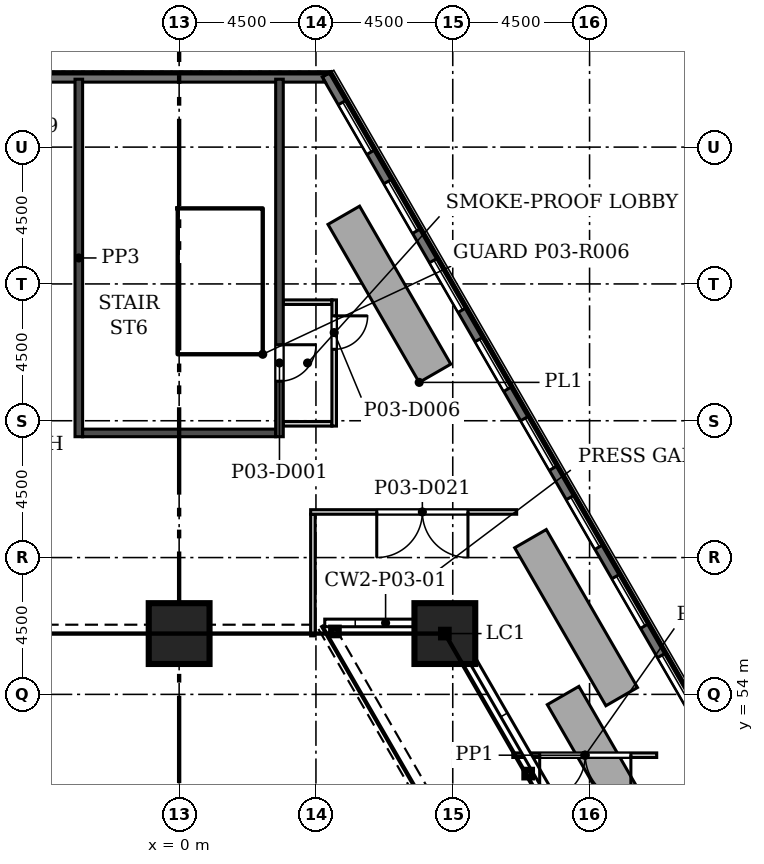
"""IFC4 building model, lengths in metres.
Left out: names, types, materials, properties, quantities, classifications, styles, units other than length and angle.
Written with IfcOpenShell. Run it as: python <this file> out.ifc"""

import sys

from ifc_helpers import new_model, si_unit, direction, frame, frame_2d, origin, origin_2d, place, context, subcontext, project, spatial, polyline, rectangle, hollow_rectangle, outline, extrude, element, fill, save


model = new_model("IFC4")
c1 = context("Model", 3, precision=1e-05, world=origin(), true_north=direction((0.0, 1.0)))
c2 = subcontext(c1, "Body", "Model", "MODEL_VIEW")
j1 = project(units=[si_unit("LENGTHUNIT", "METRE"), si_unit("PLANEANGLEUNIT", "RADIAN")], contexts=[c1])
p1 = place(None, origin())
s1 = spatial("IfcSite", under=j1, at=p1, CompositionType="ELEMENT")
p2 = place(p1, origin())
s2 = spatial("IfcBuilding", under=s1, at=p2, CompositionType="ELEMENT")
p3 = place(p2, frame((0.0, 0.0, 20.0)))
s3 = spatial("IfcBuildingStorey", under=s2, at=p3, CompositionType="ELEMENT", Elevation=20.0)
for number, where, z_axis, x_axis in (
    (1, (8.74, 56.0, 0.0), (0.0, 0.0, 1.0), (1.0, 0.0, 0.0)),
    (2, (0.0, 56.0, 0.0), (0.0, 0.0, 1.0), (1.0, 0.0, 0.0)),
):
    element("IfcColumn", number, at=place(p3, frame(where, z_axis=z_axis, x_axis=x_axis)), inside=s3, PredefinedType="COLUMN", context=c2, shape_type="SweptSolid", body=[
        extrude(rectangle(XDim=2.0, YDim=2.0, at=origin_2d()), origin(), (0.0, 0.0, 1.0), 5.0),
    ])
p4 = place(p3, frame((42.853, 8.575, 0.0), z_axis=(0.0, 0.0, 1.0), x_axis=(-0.49999894854, 0.866026010844, 0.0)))
e3 = element("IfcWall", 3, at=p4, inside=s3, PredefinedType="SOLIDWALL", context=c2, shape_type="SweptSolid", body=[
    extrude(rectangle(XDim=76.0, YDim=0.34, at=frame_2d((38.0, 0.0))), origin(), (0.0, 0.0, 1.0), 3.0),
])
p5 = place(p4, frame((1.058, 0.0, 0.9)))
e4 = element("IfcOpeningElement", 4, at=p5, cuts=e3, PredefinedType="OPENING", context=c2, shape_type="SweptSolid", body=[
    extrude(rectangle(XDim=1.885, YDim=1.9, at=frame_2d((0.942, 0.95))), frame((0.0, 0.18, 0.0), z_axis=(0.0, -1.0, 0.0), x_axis=(1.0, 0.0, 0.0)), (0.0, 0.0, 1.0), 0.36),
])
p6 = place(p4, frame((4.058, 0.0, 0.9)))
e5 = element("IfcOpeningElement", 5, at=p6, cuts=e3, PredefinedType="OPENING", context=c2, shape_type="SweptSolid", body=[
    extrude(rectangle(XDim=1.885, YDim=1.9, at=frame_2d((0.942, 0.95))), frame((0.0, 0.18, 0.0), z_axis=(0.0, -1.0, 0.0), x_axis=(1.0, 0.0, 0.0)), (0.0, 0.0, 1.0), 0.36),
])
p7 = place(p4, frame((7.058, 0.0, 0.9)))
e6 = element("IfcOpeningElement", 6, at=p7, cuts=e3, PredefinedType="OPENING", context=c2, shape_type="SweptSolid", body=[
    extrude(rectangle(XDim=1.885, YDim=1.9, at=frame_2d((0.942, 0.95))), frame((0.0, 0.18, 0.0), z_axis=(0.0, -1.0, 0.0), x_axis=(1.0, 0.0, 0.0)), (0.0, 0.0, 1.0), 0.36),
])
p8 = place(p4, frame((10.058, 0.0, 0.9)))
e7 = element("IfcOpeningElement", 7, at=p8, cuts=e3, PredefinedType="OPENING", context=c2, shape_type="SweptSolid", body=[
    extrude(rectangle(XDim=1.885, YDim=1.9, at=frame_2d((0.942, 0.95))), frame((0.0, 0.18, 0.0), z_axis=(0.0, -1.0, 0.0), x_axis=(1.0, 0.0, 0.0)), (0.0, 0.0, 1.0), 0.36),
])
p9 = place(p4, frame((13.058, 0.0, 0.9)))
e8 = element("IfcOpeningElement", 8, at=p9, cuts=e3, PredefinedType="OPENING", context=c2, shape_type="SweptSolid", body=[
    extrude(rectangle(XDim=1.885, YDim=1.9, at=frame_2d((0.942, 0.95))), frame((0.0, 0.18, 0.0), z_axis=(0.0, -1.0, 0.0), x_axis=(1.0, 0.0, 0.0)), (0.0, 0.0, 1.0), 0.36),
])
p10 = place(p4, frame((16.058, 0.0, 0.9)))
e9 = element("IfcOpeningElement", 9, at=p10, cuts=e3, PredefinedType="OPENING", context=c2, shape_type="SweptSolid", body=[
    extrude(rectangle(XDim=1.885, YDim=1.9, at=frame_2d((0.942, 0.95))), frame((0.0, 0.18, 0.0), z_axis=(0.0, -1.0, 0.0), x_axis=(1.0, 0.0, 0.0)), (0.0, 0.0, 1.0), 0.36),
])
p11 = place(p4, frame((19.058, 0.0, 0.9)))
e10 = element("IfcOpeningElement", 10, at=p11, cuts=e3, PredefinedType="OPENING", context=c2, shape_type="SweptSolid", body=[
    extrude(rectangle(XDim=1.885, YDim=1.9, at=frame_2d((0.942, 0.95))), frame((0.0, 0.18, 0.0), z_axis=(0.0, -1.0, 0.0), x_axis=(1.0, 0.0, 0.0)), (0.0, 0.0, 1.0), 0.36),
])
p12 = place(p4, frame((22.058, 0.0, 0.9)))
e11 = element("IfcOpeningElement", 11, at=p12, cuts=e3, PredefinedType="OPENING", context=c2, shape_type="SweptSolid", body=[
    extrude(rectangle(XDim=1.885, YDim=1.9, at=frame_2d((0.942, 0.95))), frame((0.0, 0.18, 0.0), z_axis=(0.0, -1.0, 0.0), x_axis=(1.0, 0.0, 0.0)), (0.0, 0.0, 1.0), 0.36),
])
p13 = place(p4, frame((25.058, 0.0, 0.9)))
e12 = element("IfcOpeningElement", 12, at=p13, cuts=e3, PredefinedType="OPENING", context=c2, shape_type="SweptSolid", body=[
    extrude(rectangle(XDim=1.885, YDim=1.9, at=frame_2d((0.942, 0.95))), frame((0.0, 0.18, 0.0), z_axis=(0.0, -1.0, 0.0), x_axis=(1.0, 0.0, 0.0)), (0.0, 0.0, 1.0), 0.36),
])
p14 = place(p4, frame((28.058, 0.0, 0.9)))
e13 = element("IfcOpeningElement", 13, at=p14, cuts=e3, PredefinedType="OPENING", context=c2, shape_type="SweptSolid", body=[
    extrude(rectangle(XDim=1.885, YDim=1.9, at=frame_2d((0.942, 0.95))), frame((0.0, 0.18, 0.0), z_axis=(0.0, -1.0, 0.0), x_axis=(1.0, 0.0, 0.0)), (0.0, 0.0, 1.0), 0.36),
])
p15 = place(p4, frame((31.058, 0.0, 0.9)))
e14 = element("IfcOpeningElement", 14, at=p15, cuts=e3, PredefinedType="OPENING", context=c2, shape_type="SweptSolid", body=[
    extrude(rectangle(XDim=1.885, YDim=1.9, at=frame_2d((0.942, 0.95))), frame((0.0, 0.18, 0.0), z_axis=(0.0, -1.0, 0.0), x_axis=(1.0, 0.0, 0.0)), (0.0, 0.0, 1.0), 0.36),
])
p16 = place(p4, frame((34.058, 0.0, 0.9)))
e15 = element("IfcOpeningElement", 15, at=p16, cuts=e3, PredefinedType="OPENING", context=c2, shape_type="SweptSolid", body=[
    extrude(rectangle(XDim=1.885, YDim=1.9, at=frame_2d((0.942, 0.95))), frame((0.0, 0.18, 0.0), z_axis=(0.0, -1.0, 0.0), x_axis=(1.0, 0.0, 0.0)), (0.0, 0.0, 1.0), 0.36),
])
p17 = place(p4, frame((37.058, 0.0, 0.9)))
e16 = element("IfcOpeningElement", 16, at=p17, cuts=e3, PredefinedType="OPENING", context=c2, shape_type="SweptSolid", body=[
    extrude(rectangle(XDim=1.885, YDim=1.9, at=frame_2d((0.942, 0.95))), frame((0.0, 0.18, 0.0), z_axis=(0.0, -1.0, 0.0), x_axis=(1.0, 0.0, 0.0)), (0.0, 0.0, 1.0), 0.36),
])
p18 = place(p4, frame((40.058, 0.0, 0.9)))
e17 = element("IfcOpeningElement", 17, at=p18, cuts=e3, PredefinedType="OPENING", context=c2, shape_type="SweptSolid", body=[
    extrude(rectangle(XDim=1.885, YDim=1.9, at=frame_2d((0.942, 0.95))), frame((0.0, 0.18, 0.0), z_axis=(0.0, -1.0, 0.0), x_axis=(1.0, 0.0, 0.0)), (0.0, 0.0, 1.0), 0.36),
])
p19 = place(p4, frame((43.058, 0.0, 0.9)))
e18 = element("IfcOpeningElement", 18, at=p19, cuts=e3, PredefinedType="OPENING", context=c2, shape_type="SweptSolid", body=[
    extrude(rectangle(XDim=1.885, YDim=1.9, at=frame_2d((0.942, 0.95))), frame((0.0, 0.18, 0.0), z_axis=(0.0, -1.0, 0.0), x_axis=(1.0, 0.0, 0.0)), (0.0, 0.0, 1.0), 0.36),
])
p20 = place(p4, frame((46.058, 0.0, 0.9)))
e19 = element("IfcOpeningElement", 19, at=p20, cuts=e3, PredefinedType="OPENING", context=c2, shape_type="SweptSolid", body=[
    extrude(rectangle(XDim=1.885, YDim=1.9, at=frame_2d((0.942, 0.95))), frame((0.0, 0.18, 0.0), z_axis=(0.0, -1.0, 0.0), x_axis=(1.0, 0.0, 0.0)), (0.0, 0.0, 1.0), 0.36),
])
p21 = place(p4, frame((49.058, 0.0, 0.9)))
e20 = element("IfcOpeningElement", 20, at=p21, cuts=e3, PredefinedType="OPENING", context=c2, shape_type="SweptSolid", body=[
    extrude(rectangle(XDim=1.885, YDim=1.9, at=frame_2d((0.942, 0.95))), frame((0.0, 0.18, 0.0), z_axis=(0.0, -1.0, 0.0), x_axis=(1.0, 0.0, 0.0)), (0.0, 0.0, 1.0), 0.36),
])
p22 = place(p4, frame((52.058, 0.0, 0.9)))
e21 = element("IfcOpeningElement", 21, at=p22, cuts=e3, PredefinedType="OPENING", context=c2, shape_type="SweptSolid", body=[
    extrude(rectangle(XDim=1.885, YDim=1.9, at=frame_2d((0.942, 0.95))), frame((0.0, 0.18, 0.0), z_axis=(0.0, -1.0, 0.0), x_axis=(1.0, 0.0, 0.0)), (0.0, 0.0, 1.0), 0.36),
])
p23 = place(p4, frame((55.058, 0.0, 0.9)))
e22 = element("IfcOpeningElement", 22, at=p23, cuts=e3, PredefinedType="OPENING", context=c2, shape_type="SweptSolid", body=[
    extrude(rectangle(XDim=1.885, YDim=1.9, at=frame_2d((0.942, 0.95))), frame((0.0, 0.18, 0.0), z_axis=(0.0, -1.0, 0.0), x_axis=(1.0, 0.0, 0.0)), (0.0, 0.0, 1.0), 0.36),
])
p24 = place(p4, frame((58.058, 0.0, 0.9)))
e23 = element("IfcOpeningElement", 23, at=p24, cuts=e3, PredefinedType="OPENING", context=c2, shape_type="SweptSolid", body=[
    extrude(rectangle(XDim=1.885, YDim=1.9, at=frame_2d((0.942, 0.95))), frame((0.0, 0.18, 0.0), z_axis=(0.0, -1.0, 0.0), x_axis=(1.0, 0.0, 0.0)), (0.0, 0.0, 1.0), 0.36),
])
p25 = place(p4, frame((61.058, 0.0, 0.9)))
e24 = element("IfcOpeningElement", 24, at=p25, cuts=e3, PredefinedType="OPENING", context=c2, shape_type="SweptSolid", body=[
    extrude(rectangle(XDim=1.885, YDim=1.9, at=frame_2d((0.942, 0.95))), frame((0.0, 0.18, 0.0), z_axis=(0.0, -1.0, 0.0), x_axis=(1.0, 0.0, 0.0)), (0.0, 0.0, 1.0), 0.36),
])
p26 = place(p4, frame((64.058, 0.0, 0.9)))
e25 = element("IfcOpeningElement", 25, at=p26, cuts=e3, PredefinedType="OPENING", context=c2, shape_type="SweptSolid", body=[
    extrude(rectangle(XDim=1.885, YDim=1.9, at=frame_2d((0.942, 0.95))), frame((0.0, 0.18, 0.0), z_axis=(0.0, -1.0, 0.0), x_axis=(1.0, 0.0, 0.0)), (0.0, 0.0, 1.0), 0.36),
])
p27 = place(p4, frame((67.058, 0.0, 0.9)))
e26 = element("IfcOpeningElement", 26, at=p27, cuts=e3, PredefinedType="OPENING", context=c2, shape_type="SweptSolid", body=[
    extrude(rectangle(XDim=1.885, YDim=1.9, at=frame_2d((0.942, 0.95))), frame((0.0, 0.18, 0.0), z_axis=(0.0, -1.0, 0.0), x_axis=(1.0, 0.0, 0.0)), (0.0, 0.0, 1.0), 0.36),
])
p28 = place(p4, frame((70.058, 0.0, 0.9)))
e27 = element("IfcOpeningElement", 27, at=p28, cuts=e3, PredefinedType="OPENING", context=c2, shape_type="SweptSolid", body=[
    extrude(rectangle(XDim=1.885, YDim=1.9, at=frame_2d((0.942, 0.95))), frame((0.0, 0.18, 0.0), z_axis=(0.0, -1.0, 0.0), x_axis=(1.0, 0.0, 0.0)), (0.0, 0.0, 1.0), 0.36),
])
p29 = place(p4, frame((73.058, 0.0, 0.9)))
e28 = element("IfcOpeningElement", 28, at=p29, cuts=e3, PredefinedType="OPENING", context=c2, shape_type="SweptSolid", body=[
    extrude(rectangle(XDim=1.885, YDim=1.9, at=frame_2d((0.942, 0.95))), frame((0.0, 0.18, 0.0), z_axis=(0.0, -1.0, 0.0), x_axis=(1.0, 0.0, 0.0)), (0.0, 0.0, 1.0), 0.36),
])
p30 = place(p3, origin())
e29 = element("IfcWall", 29, at=p30, inside=s3, PredefinedType="SOLIDWALL", context=c2, shape_type="SweptSolid", body=[
    extrude(outline(polyline([(5.001, 74.478), (4.706, 74.308), (4.805, 74.138), (-4.805, 74.138), (-4.706, 74.308), (-5.001, 74.478), (-5.001, 74.479), (5.001, 74.479), (5.001, 74.478)])), origin(), (0.0, 0.0, 1.0), 3.0),
])
p31 = place(p3, frame((0.0, 0.0, 5.0)))
e30 = element("IfcWall", 30, at=p31, inside=s3, PredefinedType="USERDEFINED", context=c2, shape_type="SweptSolid", body=[
    extrude(outline(polyline([(5.935, 70.058), (4.896, 69.458), (7.896, 64.262), (8.935, 64.862), (5.935, 70.058)])), origin(), (0.0, 0.0, 1.0), 1.1),
])
p32 = place(p3, frame((0.0, 0.0, 5.0)))
e31 = element("IfcWall", 31, at=p32, inside=s3, PredefinedType="USERDEFINED", context=c2, shape_type="SweptSolid", body=[
    extrude(outline(polyline([(12.076, 59.422), (11.037, 58.822), (14.037, 53.625), (15.076, 54.226), (12.076, 59.422)])), origin(), (0.0, 0.0, 1.0), 1.1),
])
p33 = place(p3, frame((0.0, 0.0, 5.0)))
e32 = element("IfcWall", 32, at=p33, inside=s3, PredefinedType="USERDEFINED", context=c2, shape_type="SweptSolid", body=[
    extrude(outline(polyline([(15.11, 48.467), (16.149, 49.067), (13.149, 54.263), (12.11, 53.663), (15.11, 48.467)])), origin(), (0.0, 0.0, 1.0), 1.1),
])
for number, where, z_axis, x_axis in (
    (33, (8.74, 56.0, 5.0), (0.0, 0.0, 1.0), (1.0, 0.0, 0.0)),
    (34, (5.125, 56.07, 5.0), (0.0, 0.0, 1.0), (1.0, 0.0, 0.0)),
    (35, (11.48, 51.394, 5.0), (0.0, 0.0, 1.0), (1.0, 0.0, 0.0)),
):
    element("IfcColumn", number, at=place(p3, frame(where, z_axis=z_axis, x_axis=x_axis)), inside=s3, PredefinedType="COLUMN", context=c2, shape_type="SweptSolid", body=[
        extrude(hollow_rectangle(XDim=0.25, YDim=0.25, WallThickness=0.012, at=origin_2d()), origin(), (0.0, 0.0, 1.0), 3.6),
    ])
p34 = place(p3, frame((10.975, 52.0, 0.0), z_axis=(0.0, 0.0, 1.0), x_axis=(1.0, 0.0, 0.0)))
e36 = element("IfcWall", 36, at=p34, inside=s3, PredefinedType="PARTITIONING", context=c2, shape_type="SweptSolid", body=[
    extrude(rectangle(XDim=4.734, YDim=0.15, at=frame_2d((2.367, 0.0))), origin(), (0.0, 0.0, 1.0), 3.0),
])
p35 = place(p34, frame((0.885, 0.0, 0.0)))
e37 = element("IfcOpeningElement", 37, at=p35, cuts=e36, PredefinedType="OPENING", context=c2, shape_type="SweptSolid", body=[
    extrude(rectangle(XDim=3.0, YDim=2.4, at=frame_2d((1.5, 1.2))), frame((0.0, 0.085, 0.0), z_axis=(0.0, -1.0, 0.0), x_axis=(1.0, 0.0, 0.0)), (0.0, 0.0, 1.0), 0.17),
])
p36 = place(p3, frame((4.4, 55.925, 0.0), z_axis=(0.0, 0.0, 1.0), x_axis=(0.0, 1.0, 0.0)))
e38 = element("IfcWall", 38, at=p36, inside=s3, PredefinedType="PARTITIONING", context=c2, shape_type="SweptSolid", body=[
    extrude(rectangle(XDim=4.0, YDim=0.15, at=frame_2d((2.0, 0.0))), origin(), (0.0, 0.0, 1.0), 3.0),
])
p37 = place(p3, frame((4.325, 60.0, 0.0), z_axis=(0.0, 0.0, 1.0), x_axis=(1.0, 0.0, 0.0)))
e39 = element("IfcWall", 39, at=p37, inside=s3, PredefinedType="PARTITIONING", context=c2, shape_type="SweptSolid", body=[
    extrude(rectangle(XDim=6.777, YDim=0.15, at=frame_2d((3.389, 0.0))), origin(), (0.0, 0.0, 1.0), 3.0),
])
p38 = place(p37, frame((2.175, 0.0, 0.0)))
e40 = element("IfcOpeningElement", 40, at=p38, cuts=e39, PredefinedType="OPENING", context=c2, shape_type="SweptSolid", body=[
    extrude(rectangle(XDim=3.0, YDim=2.4, at=frame_2d((1.5, 1.2))), frame((0.0, 0.085, 0.0), z_axis=(0.0, -1.0, 0.0), x_axis=(1.0, 0.0, 0.0)), (0.0, 0.0, 1.0), 0.17),
])
p39 = place(p3, frame((-3.3, 62.475, 0.0), z_axis=(0.0, 0.0, 1.0), x_axis=(0.0, 1.0, 0.0)))
e41 = element("IfcWall", 41, at=p39, inside=s3, PredefinedType="SOLIDWALL", context=c2, shape_type="SweptSolid", body=[
    extrude(rectangle(XDim=11.758, YDim=0.25, at=frame_2d((5.879, 0.0))), origin(), (0.0, 0.0, 1.0), 3.0),
])
p40 = place(p3, frame((3.175, 62.6, 0.0), z_axis=(0.0, 0.0, 1.0), x_axis=(-1.0, 0.0, 0.0)))
e42 = element("IfcWall", 42, at=p40, inside=s3, PredefinedType="SOLIDWALL", context=c2, shape_type="SweptSolid", body=[
    extrude(rectangle(XDim=6.35, YDim=0.25, at=frame_2d((3.175, 0.0))), origin(), (0.0, 0.0, 1.0), 3.0),
])
for number, where, z_axis, x_axis in (
    (43, (5.025, 62.9, 0.0), (0.0, 0.0, 1.0), (-1.0, 0.0, 0.0)),
    (44, (3.425, 66.9, 0.0), (0.0, 0.0, 1.0), (1.0, 0.0, 0.0)),
):
    element("IfcWall", number, at=place(p3, frame(where, z_axis=z_axis, x_axis=x_axis)), inside=s3, PredefinedType="PARTITIONING", context=c2, shape_type="SweptSolid", body=[
        extrude(rectangle(XDim=1.6, YDim=0.15, at=frame_2d((0.8, 0.0))), origin(), (0.0, 0.0, 1.0), 3.0),
    ])
p41 = place(p3, frame((5.1, 66.975, 0.0), z_axis=(0.0, 0.0, 1.0), x_axis=(0.0, -1.0, 0.0)))
e45 = element("IfcWall", 45, at=p41, inside=s3, PredefinedType="PARTITIONING", context=c2, shape_type="SweptSolid", body=[
    extrude(rectangle(XDim=4.15, YDim=0.15, at=frame_2d((2.075, 0.0))), origin(), (0.0, 0.0, 1.0), 3.0),
])
p42 = place(p41, frame((0.525, 0.0, 0.0)))
e46 = element("IfcOpeningElement", 46, at=p42, cuts=e45, PredefinedType="OPENING", context=c2, shape_type="SweptSolid", body=[
    extrude(rectangle(XDim=1.1, YDim=2.1, at=frame_2d((0.55, 1.05))), frame((0.0, 0.085, 0.0), z_axis=(0.0, -1.0, 0.0), x_axis=(1.0, 0.0, 0.0)), (0.0, 0.0, 1.0), 0.17),
])
p43 = place(p3, frame((3.3, 74.233, 0.0), z_axis=(0.0, 0.0, 1.0), x_axis=(0.0, -1.0, 0.0)))
e47 = element("IfcWall", 47, at=p43, inside=s3, PredefinedType="SOLIDWALL", context=c2, shape_type="SweptSolid", body=[
    extrude(rectangle(XDim=11.758, YDim=0.25, at=frame_2d((5.879, 0.0))), origin(), (0.0, 0.0, 1.0), 3.0),
])
p44 = place(p43, frame((8.733, 0.0, 0.0)))
e48 = element("IfcOpeningElement", 48, at=p44, cuts=e47, PredefinedType="OPENING", context=c2, shape_type="SweptSolid", body=[
    extrude(rectangle(XDim=1.2, YDim=2.1, at=frame_2d((0.6, 1.05))), frame((0.0, 0.135, 0.0), z_axis=(0.0, -1.0, 0.0), x_axis=(1.0, 0.0, 0.0)), (0.0, 0.0, 1.0), 0.27),
])
p45 = place(p22, origin())
e49 = element("IfcWindow", 49, at=p45, inside=s3, PartitioningType="SINGLE_PANEL", PredefinedType="WINDOW", context=c2, shape_type="SweptSolid", body=[
    extrude(rectangle(XDim=1.885, YDim=1.9, at=frame_2d((0.942, 0.95))), frame((0.0, 0.11, 0.0), z_axis=(0.0, -1.0, 0.0), x_axis=(1.0, 0.0, 0.0)), (0.0, 0.0, 1.0), 0.06),
])
fill(e21, e49)
p46 = place(p23, origin())
e50 = element("IfcWindow", 50, at=p46, inside=s3, PartitioningType="SINGLE_PANEL", PredefinedType="WINDOW", context=c2, shape_type="SweptSolid", body=[
    extrude(rectangle(XDim=1.885, YDim=1.9, at=frame_2d((0.942, 0.95))), frame((0.0, 0.11, 0.0), z_axis=(0.0, -1.0, 0.0), x_axis=(1.0, 0.0, 0.0)), (0.0, 0.0, 1.0), 0.06),
])
fill(e22, e50)
p47 = place(p24, origin())
e51 = element("IfcWindow", 51, at=p47, inside=s3, PartitioningType="SINGLE_PANEL", PredefinedType="WINDOW", context=c2, shape_type="SweptSolid", body=[
    extrude(rectangle(XDim=1.885, YDim=1.9, at=frame_2d((0.942, 0.95))), frame((0.0, 0.11, 0.0), z_axis=(0.0, -1.0, 0.0), x_axis=(1.0, 0.0, 0.0)), (0.0, 0.0, 1.0), 0.06),
])
fill(e23, e51)
p48 = place(p25, origin())
e52 = element("IfcWindow", 52, at=p48, inside=s3, PartitioningType="SINGLE_PANEL", PredefinedType="WINDOW", context=c2, shape_type="SweptSolid", body=[
    extrude(rectangle(XDim=1.885, YDim=1.9, at=frame_2d((0.942, 0.95))), frame((0.0, 0.11, 0.0), z_axis=(0.0, -1.0, 0.0), x_axis=(1.0, 0.0, 0.0)), (0.0, 0.0, 1.0), 0.06),
])
fill(e24, e52)
p49 = place(p26, origin())
e53 = element("IfcWindow", 53, at=p49, inside=s3, PartitioningType="SINGLE_PANEL", PredefinedType="WINDOW", context=c2, shape_type="SweptSolid", body=[
    extrude(rectangle(XDim=1.885, YDim=1.9, at=frame_2d((0.942, 0.95))), frame((0.0, 0.11, 0.0), z_axis=(0.0, -1.0, 0.0), x_axis=(1.0, 0.0, 0.0)), (0.0, 0.0, 1.0), 0.06),
])
fill(e25, e53)
p50 = place(p27, origin())
e54 = element("IfcWindow", 54, at=p50, inside=s3, PartitioningType="SINGLE_PANEL", PredefinedType="WINDOW", context=c2, shape_type="SweptSolid", body=[
    extrude(rectangle(XDim=1.885, YDim=1.9, at=frame_2d((0.942, 0.95))), frame((0.0, 0.11, 0.0), z_axis=(0.0, -1.0, 0.0), x_axis=(1.0, 0.0, 0.0)), (0.0, 0.0, 1.0), 0.06),
])
fill(e26, e54)
p51 = place(p28, origin())
e55 = element("IfcWindow", 55, at=p51, inside=s3, PartitioningType="SINGLE_PANEL", PredefinedType="WINDOW", context=c2, shape_type="SweptSolid", body=[
    extrude(rectangle(XDim=1.885, YDim=1.9, at=frame_2d((0.942, 0.95))), frame((0.0, 0.11, 0.0), z_axis=(0.0, -1.0, 0.0), x_axis=(1.0, 0.0, 0.0)), (0.0, 0.0, 1.0), 0.06),
])
fill(e27, e55)
p52 = place(p29, origin())
e56 = element("IfcWindow", 56, at=p52, inside=s3, PartitioningType="SINGLE_PANEL", PredefinedType="WINDOW", context=c2, shape_type="SweptSolid", body=[
    extrude(rectangle(XDim=1.885, YDim=1.9, at=frame_2d((0.942, 0.95))), frame((0.0, 0.11, 0.0), z_axis=(0.0, -1.0, 0.0), x_axis=(1.0, 0.0, 0.0)), (0.0, 0.0, 1.0), 0.06),
])
fill(e28, e56)
p53 = place(p44, origin())
e57 = element("IfcDoor", 57, at=p53, inside=s3, OperationType="SINGLE_SWING_LEFT", PredefinedType="DOOR", context=c2, shape_type="SweptSolid", body=[
    extrude(rectangle(XDim=1.2, YDim=2.1, at=frame_2d((0.6, 1.05))), frame((0.0, 0.025, 0.0), z_axis=(0.0, -1.0, 0.0), x_axis=(1.0, 0.0, 0.0)), (0.0, 0.0, 1.0), 0.05),
])
fill(e48, e57)
p54 = place(p42, origin())
e58 = element("IfcDoor", 58, at=p54, inside=s3, OperationType="SINGLE_SWING_LEFT", PredefinedType="DOOR", context=c2, shape_type="SweptSolid", body=[
    extrude(rectangle(XDim=1.1, YDim=2.1, at=frame_2d((0.55, 1.05))), frame((0.0, 0.025, 0.0), z_axis=(0.0, -1.0, 0.0), x_axis=(1.0, 0.0, 0.0)), (0.0, 0.0, 1.0), 0.05),
])
fill(e46, e58)
p55 = place(p38, frame((3.0, 0.0, 0.0), z_axis=(0.0, 0.0, 1.0), x_axis=(-1.0, 0.0, 0.0)))
e59 = element("IfcDoor", 59, at=p55, inside=s3, OperationType="DOUBLE_DOOR_SINGLE_SWING", PredefinedType="DOOR", context=c2, shape_type="SweptSolid", body=[
    extrude(rectangle(XDim=3.0, YDim=2.4, at=frame_2d((1.5, 1.2))), frame((0.0, 0.025, 0.0), z_axis=(0.0, -1.0, 0.0), x_axis=(1.0, 0.0, 0.0)), (0.0, 0.0, 1.0), 0.05),
])
fill(e40, e59)
p56 = place(p35, frame((3.0, 0.0, 0.0), z_axis=(0.0, 0.0, 1.0), x_axis=(-1.0, 0.0, 0.0)))
e60 = element("IfcDoor", 60, at=p56, inside=s3, OperationType="DOUBLE_DOOR_SINGLE_SWING", PredefinedType="DOOR", context=c2, shape_type="SweptSolid", body=[
    extrude(rectangle(XDim=3.0, YDim=2.4, at=frame_2d((1.5, 1.2))), frame((0.0, 0.025, 0.0), z_axis=(0.0, -1.0, 0.0), x_axis=(1.0, 0.0, 0.0)), (0.0, 0.0, 1.0), 0.05),
])
fill(e37, e60)
save(model, sys.argv[1])
